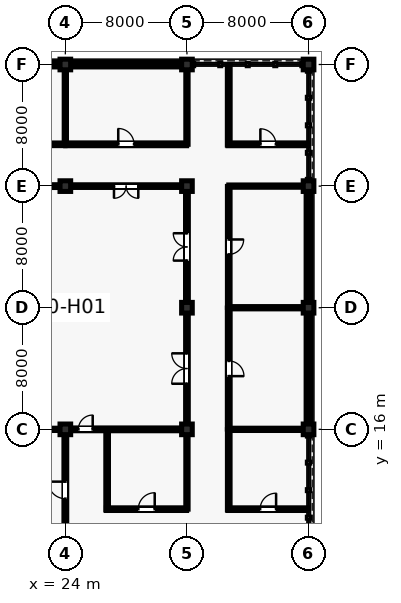
"""IFC4 building model, lengths in metres.
Left out: names, types, materials, properties, quantities, classifications, styles, units other than length and angle.
Written with IfcOpenShell. Run it as: python <this file> out.ifc"""

import sys

from ifc_helpers import new_model, si_unit, direction, frame, frame_2d, origin, origin_2d, place, context, subcontext, project, spatial, rectangle, extrude, element, fill, save


model = new_model("IFC4")
c1 = context("Model", 3, precision=1e-05, world=origin(), true_north=direction((0.0, 1.0)))
c2 = subcontext(c1, "Body", "Model", "MODEL_VIEW")
j1 = project(units=[si_unit("LENGTHUNIT", "METRE"), si_unit("PLANEANGLEUNIT", "RADIAN")], contexts=[c1])
p1 = place(None, origin())
s1 = spatial("IfcSite", under=j1, at=p1, CompositionType="ELEMENT")
p2 = place(p1, origin())
s2 = spatial("IfcBuilding", under=s1, at=p2, CompositionType="ELEMENT")
p3 = place(p2, origin())
s3 = spatial("IfcBuildingStorey", under=s2, at=p3, CompositionType="ELEMENT", Elevation=0.0)
for number, where, z_axis, x_axis in (
    (1, (24.0, 16.0, 0.0), (0.0, 0.0, 1.0), (1.0, 0.0, 0.0)),
    (2, (24.0, 32.0, 0.0), (0.0, 0.0, 1.0), (1.0, 0.0, 0.0)),
    (3, (24.0, 40.0, 0.0), (0.0, 0.0, 1.0), (1.0, 0.0, 0.0)),
    (4, (32.0, 16.0, 0.0), (0.0, 0.0, 1.0), (1.0, 0.0, 0.0)),
    (5, (32.0, 24.0, 0.0), (0.0, 0.0, 1.0), (1.0, 0.0, 0.0)),
    (6, (32.0, 32.0, 0.0), (0.0, 0.0, 1.0), (1.0, 0.0, 0.0)),
    (7, (32.0, 40.0, 0.0), (0.0, 0.0, 1.0), (1.0, 0.0, 0.0)),
    (8, (40.0, 16.0, 0.0), (0.0, 0.0, 1.0), (1.0, 0.0, 0.0)),
    (9, (40.0, 24.0, 0.0), (0.0, 0.0, 1.0), (1.0, 0.0, 0.0)),
    (10, (40.0, 32.0, 0.0), (0.0, 0.0, 1.0), (1.0, 0.0, 0.0)),
    (11, (40.0, 40.0, 0.0), (0.0, 0.0, 1.0), (1.0, 0.0, 0.0)),
):
    element("IfcColumn", number, at=place(p3, frame(where, z_axis=z_axis, x_axis=x_axis)), inside=s3, PredefinedType="COLUMN", context=c2, shape_type="SweptSolid", body=[
        extrude(rectangle(XDim=0.7, YDim=0.7, at=origin_2d()), origin(), (0.0, 0.0, 1.0), 5.28),
    ])
p4 = place(p3, frame((16.335, 40.0, 0.0), z_axis=(0.0, 0.0, 1.0), x_axis=(1.0, 0.0, 0.0)))
e12 = element("IfcWall", 12, at=p4, inside=s3, PredefinedType="SOLIDWALL", context=c2, shape_type="SweptSolid", body=[
    extrude(rectangle(XDim=7.33, YDim=0.32, at=frame_2d((3.665, 0.0))), origin(), (0.0, 0.0, 1.0), 4.677),
])
p5 = place(p4, frame((2.74, 0.0, 0.9)))
e13 = element("IfcOpeningElement", 13, at=p5, cuts=e12, PredefinedType="OPENING", context=c2, shape_type="SweptSolid", body=[
    extrude(rectangle(XDim=1.85, YDim=2.65, at=frame_2d((0.925, 1.325))), frame((0.0, 0.17, 0.0), z_axis=(0.0, -1.0, 0.0), x_axis=(1.0, 0.0, 0.0)), (0.0, 0.0, 1.0), 0.34),
])
p6 = place(p3, frame((24.335, 40.0, 0.0), z_axis=(0.0, 0.0, 1.0), x_axis=(1.0, 0.0, 0.0)))
e14 = element("IfcWall", 14, at=p6, inside=s3, PredefinedType="SOLIDWALL", context=c2, shape_type="SweptSolid", body=[
    extrude(rectangle(XDim=7.33, YDim=0.32, at=frame_2d((3.665, 0.0))), origin(), (0.0, 0.0, 1.0), 4.61),
])
p7 = place(p6, frame((2.515, 0.0, 0.9)))
e15 = element("IfcOpeningElement", 15, at=p7, cuts=e14, PredefinedType="OPENING", context=c2, shape_type="SweptSolid", body=[
    extrude(rectangle(XDim=2.3, YDim=2.55, at=frame_2d((1.15, 1.275))), frame((0.0, 0.17, 0.0), z_axis=(0.0, -1.0, 0.0), x_axis=(1.0, 0.0, 0.0)), (0.0, 0.0, 1.0), 0.34),
])
p8 = place(p3, frame((40.0, 16.335, 0.0), z_axis=(0.0, 0.0, 1.0), x_axis=(0.0, 1.0, 0.0)))
e16 = element("IfcWall", 16, at=p8, inside=s3, PredefinedType="SOLIDWALL", context=c2, shape_type="SweptSolid", body=[
    extrude(rectangle(XDim=7.33, YDim=0.32, at=frame_2d((3.665, 0.0))), origin(), (0.0, 0.0, 1.0), 4.677),
])
p9 = place(p8, frame((2.74, 0.0, 0.9)))
e17 = element("IfcOpeningElement", 17, at=p9, cuts=e16, PredefinedType="OPENING", context=c2, shape_type="SweptSolid", body=[
    extrude(rectangle(XDim=1.85, YDim=2.65, at=frame_2d((0.925, 1.325))), frame((0.0, 0.17, 0.0), z_axis=(0.0, -1.0, 0.0), x_axis=(1.0, 0.0, 0.0)), (0.0, 0.0, 1.0), 0.34),
])
p10 = place(p3, frame((40.0, 24.335, 0.0), z_axis=(0.0, 0.0, 1.0), x_axis=(0.0, 1.0, 0.0)))
e18 = element("IfcWall", 18, at=p10, inside=s3, PredefinedType="SOLIDWALL", context=c2, shape_type="SweptSolid", body=[
    extrude(rectangle(XDim=7.33, YDim=0.32, at=frame_2d((3.665, 0.0))), origin(), (0.0, 0.0, 1.0), 4.61),
])
p11 = place(p10, frame((2.515, 0.0, 0.9)))
e19 = element("IfcOpeningElement", 19, at=p11, cuts=e18, PredefinedType="OPENING", context=c2, shape_type="SweptSolid", body=[
    extrude(rectangle(XDim=2.3, YDim=2.55, at=frame_2d((1.15, 1.275))), frame((0.0, 0.17, 0.0), z_axis=(0.0, -1.0, 0.0), x_axis=(1.0, 0.0, 0.0)), (0.0, 0.0, 1.0), 0.34),
])
p12 = place(p3, frame((16.02, 34.75, 0.0), z_axis=(0.0, 0.0, 1.0), x_axis=(1.0, 0.0, 0.0)))
e20 = element("IfcWall", 20, at=p12, inside=s3, PredefinedType="PARTITIONING", context=c2, shape_type="SweptSolid", body=[
    extrude(rectangle(XDim=7.96, YDim=0.175, at=frame_2d((3.98, 0.0))), origin(), (0.0, 0.0, 1.0), 4.404),
])
p13 = place(p12, frame((3.49, 0.0, 0.0)))
e21 = element("IfcOpeningElement", 21, at=p13, cuts=e20, PredefinedType="OPENING", context=c2, shape_type="SweptSolid", body=[
    extrude(rectangle(XDim=0.98, YDim=2.15, at=frame_2d((0.49, 1.075))), frame((0.0, 0.097, 0.0), z_axis=(0.0, -1.0, 0.0), x_axis=(1.0, 0.0, 0.0)), (0.0, 0.0, 1.0), 0.195),
])
p14 = place(p3, frame((24.0, 34.75, 0.0), z_axis=(0.0, 0.0, 1.0), x_axis=(0.0, 1.0, 0.0)))
e22 = element("IfcWall", 22, at=p14, inside=s3, PredefinedType="PARTITIONING", context=c2, shape_type="SweptSolid", body=[
    extrude(rectangle(XDim=4.89, YDim=0.15, at=frame_2d((2.445, 0.0))), origin(), (0.0, 0.0, 1.0), 4.471),
])
p15 = place(p3, frame((26.7, 10.75, 0.0), z_axis=(0.0, 0.0, 1.0), x_axis=(1.0, 0.0, 0.0)))
e23 = element("IfcWall", 23, at=p15, inside=s3, PredefinedType="PARTITIONING", context=c2, shape_type="SweptSolid", body=[
    extrude(rectangle(XDim=5.28, YDim=0.175, at=frame_2d((2.64, 0.0))), origin(), (0.0, 0.0, 1.0), 4.412),
])
p16 = place(p15, frame((2.1, 0.0, 0.0)))
e24 = element("IfcOpeningElement", 24, at=p16, cuts=e23, PredefinedType="OPENING", context=c2, shape_type="SweptSolid", body=[
    extrude(rectangle(XDim=1.08, YDim=2.2, at=frame_2d((0.54, 1.1))), frame((0.0, 0.097, 0.0), z_axis=(0.0, -1.0, 0.0), x_axis=(1.0, 0.0, 0.0)), (0.0, 0.0, 1.0), 0.195),
])
p17 = place(p3, frame((26.75, 10.7, 0.0), z_axis=(0.0, 0.0, 1.0), x_axis=(0.0, 1.0, 0.0)))
e25 = element("IfcWall", 25, at=p17, inside=s3, PredefinedType="PARTITIONING", context=c2, shape_type="SweptSolid", body=[
    extrude(rectangle(XDim=5.28, YDim=0.175, at=frame_2d((2.64, 0.0))), origin(), (0.0, 0.0, 1.0), 4.667),
])
p18 = place(p3, frame((32.0, 10.75, 0.0), z_axis=(0.0, 0.0, 1.0), x_axis=(0.0, 1.0, 0.0)))
e26 = element("IfcWall", 26, at=p18, inside=s3, PredefinedType="PARTITIONING", context=c2, shape_type="SweptSolid", body=[
    extrude(rectangle(XDim=4.89, YDim=0.15, at=frame_2d((2.445, 0.0))), origin(), (0.0, 0.0, 1.0), 4.412),
])
p19 = place(p3, frame((24.02, 34.75, 0.0), z_axis=(0.0, 0.0, 1.0), x_axis=(1.0, 0.0, 0.0)))
e27 = element("IfcWall", 27, at=p19, inside=s3, PredefinedType="PARTITIONING", context=c2, shape_type="SweptSolid", body=[
    extrude(rectangle(XDim=7.96, YDim=0.185, at=frame_2d((3.98, 0.0))), origin(), (0.0, 0.0, 1.0), 4.403),
])
p20 = place(p19, frame((3.46, 0.0, 0.0)))
e28 = element("IfcOpeningElement", 28, at=p20, cuts=e27, PredefinedType="OPENING", context=c2, shape_type="SweptSolid", body=[
    extrude(rectangle(XDim=1.04, YDim=2.18, at=frame_2d((0.52, 1.09))), frame((0.0, 0.103, 0.0), z_axis=(0.0, -1.0, 0.0), x_axis=(1.0, 0.0, 0.0)), (0.0, 0.0, 1.0), 0.205),
])
p21 = place(p3, frame((32.0, 34.75, 0.0), z_axis=(0.0, 0.0, 1.0), x_axis=(0.0, 1.0, 0.0)))
e29 = element("IfcWall", 29, at=p21, inside=s3, PredefinedType="PARTITIONING", context=c2, shape_type="SweptSolid", body=[
    extrude(rectangle(XDim=4.89, YDim=0.15, at=frame_2d((2.445, 0.0))), origin(), (0.0, 0.0, 1.0), 4.403),
])
p22 = place(p3, frame((34.7, 10.75, 0.0), z_axis=(0.0, 0.0, 1.0), x_axis=(1.0, 0.0, 0.0)))
e30 = element("IfcWall", 30, at=p22, inside=s3, PredefinedType="PARTITIONING", context=c2, shape_type="SweptSolid", body=[
    extrude(rectangle(XDim=5.28, YDim=0.175, at=frame_2d((2.64, 0.0))), origin(), (0.0, 0.0, 1.0), 4.607),
])
p23 = place(p22, frame((2.115, 0.0, 0.0)))
e31 = element("IfcOpeningElement", 31, at=p23, cuts=e30, PredefinedType="OPENING", context=c2, shape_type="SweptSolid", body=[
    extrude(rectangle(XDim=1.05, YDim=2.15, at=frame_2d((0.525, 1.075))), frame((0.0, 0.097, 0.0), z_axis=(0.0, -1.0, 0.0), x_axis=(1.0, 0.0, 0.0)), (0.0, 0.0, 1.0), 0.195),
])
p24 = place(p3, frame((34.75, 10.7, 0.0), z_axis=(0.0, 0.0, 1.0), x_axis=(0.0, 1.0, 0.0)))
e32 = element("IfcWall", 32, at=p24, inside=s3, PredefinedType="PARTITIONING", context=c2, shape_type="SweptSolid", body=[
    extrude(rectangle(XDim=5.28, YDim=0.175, at=frame_2d((2.64, 0.0))), origin(), (0.0, 0.0, 1.0), 4.336),
])
p25 = place(p3, frame((34.75, 16.0, 0.0), z_axis=(0.0, 0.0, 1.0), x_axis=(1.0, 0.0, 0.0)))
e33 = element("IfcWall", 33, at=p25, inside=s3, PredefinedType="PARTITIONING", context=c2, shape_type="SweptSolid", body=[
    extrude(rectangle(XDim=4.89, YDim=0.15, at=frame_2d((2.445, 0.0))), origin(), (0.0, 0.0, 1.0), 4.336),
])
p26 = place(p3, frame((34.75, 16.02, 0.0), z_axis=(0.0, 0.0, 1.0), x_axis=(0.0, 1.0, 0.0)))
e34 = element("IfcWall", 34, at=p26, inside=s3, PredefinedType="PARTITIONING", context=c2, shape_type="SweptSolid", body=[
    extrude(rectangle(XDim=7.96, YDim=0.185, at=frame_2d((3.98, 0.0))), origin(), (0.0, 0.0, 1.0), 4.336),
])
p27 = place(p26, frame((3.48, 0.0, 0.0)))
e35 = element("IfcOpeningElement", 35, at=p27, cuts=e34, PredefinedType="OPENING", context=c2, shape_type="SweptSolid", body=[
    extrude(rectangle(XDim=1.0, YDim=2.15, at=frame_2d((0.5, 1.075))), frame((0.0, 0.103, 0.0), z_axis=(0.0, -1.0, 0.0), x_axis=(1.0, 0.0, 0.0)), (0.0, 0.0, 1.0), 0.205),
])
p28 = place(p3, frame((34.75, 24.0, 0.0), z_axis=(0.0, 0.0, 1.0), x_axis=(1.0, 0.0, 0.0)))
e36 = element("IfcWall", 36, at=p28, inside=s3, PredefinedType="PARTITIONING", context=c2, shape_type="SweptSolid", body=[
    extrude(rectangle(XDim=4.89, YDim=0.15, at=frame_2d((2.445, 0.0))), origin(), (0.0, 0.0, 1.0), 4.404),
])
p29 = place(p3, frame((34.75, 24.02, 0.0), z_axis=(0.0, 0.0, 1.0), x_axis=(0.0, 1.0, 0.0)))
e37 = element("IfcWall", 37, at=p29, inside=s3, PredefinedType="PARTITIONING", context=c2, shape_type="SweptSolid", body=[
    extrude(rectangle(XDim=7.96, YDim=0.175, at=frame_2d((3.98, 0.0))), origin(), (0.0, 0.0, 1.0), 4.327),
])
p30 = place(p29, frame((3.49, 0.0, 0.0)))
e38 = element("IfcOpeningElement", 38, at=p30, cuts=e37, PredefinedType="OPENING", context=c2, shape_type="SweptSolid", body=[
    extrude(rectangle(XDim=0.98, YDim=2.15, at=frame_2d((0.49, 1.075))), frame((0.0, 0.097, 0.0), z_axis=(0.0, -1.0, 0.0), x_axis=(1.0, 0.0, 0.0)), (0.0, 0.0, 1.0), 0.195),
])
p31 = place(p3, frame((34.75, 32.0, 0.0), z_axis=(0.0, 0.0, 1.0), x_axis=(1.0, 0.0, 0.0)))
e39 = element("IfcWall", 39, at=p31, inside=s3, PredefinedType="PARTITIONING", context=c2, shape_type="SweptSolid", body=[
    extrude(rectangle(XDim=4.89, YDim=0.15, at=frame_2d((2.445, 0.0))), origin(), (0.0, 0.0, 1.0), 4.327),
])
p32 = place(p3, frame((34.7, 34.75, 0.0), z_axis=(0.0, 0.0, 1.0), x_axis=(1.0, 0.0, 0.0)))
e40 = element("IfcWall", 40, at=p32, inside=s3, PredefinedType="PARTITIONING", context=c2, shape_type="SweptSolid", body=[
    extrude(rectangle(XDim=5.28, YDim=0.185, at=frame_2d((2.64, 0.0))), origin(), (0.0, 0.0, 1.0), 4.667),
])
p33 = place(p32, frame((2.13, 0.0, 0.0)))
e41 = element("IfcOpeningElement", 41, at=p33, cuts=e40, PredefinedType="OPENING", context=c2, shape_type="SweptSolid", body=[
    extrude(rectangle(XDim=1.02, YDim=2.2, at=frame_2d((0.51, 1.1))), frame((0.0, 0.103, 0.0), z_axis=(0.0, -1.0, 0.0), x_axis=(1.0, 0.0, 0.0)), (0.0, 0.0, 1.0), 0.205),
])
p34 = place(p3, frame((34.75, 34.7, 0.0), z_axis=(0.0, 0.0, 1.0), x_axis=(0.0, 1.0, 0.0)))
e42 = element("IfcWall", 42, at=p34, inside=s3, PredefinedType="PARTITIONING", context=c2, shape_type="SweptSolid", body=[
    extrude(rectangle(XDim=5.28, YDim=0.185, at=frame_2d((2.64, 0.0))), origin(), (0.0, 0.0, 1.0), 4.667),
])
p35 = place(p3, frame((24.0, 8.34, 0.0), z_axis=(0.0, 0.0, 1.0), x_axis=(0.0, 1.0, 0.0)))
e43 = element("IfcWall", 43, at=p35, inside=s3, PredefinedType="PARTITIONING", context=c2, shape_type="SweptSolid", body=[
    extrude(rectangle(XDim=7.32, YDim=0.185, at=frame_2d((3.66, 0.0))), origin(), (0.0, 0.0, 1.0), 4.403),
])
p36 = place(p35, frame((3.1, 0.0, 0.0)))
e44 = element("IfcOpeningElement", 44, at=p36, cuts=e43, PredefinedType="OPENING", context=c2, shape_type="SweptSolid", body=[
    extrude(rectangle(XDim=1.12, YDim=2.22, at=frame_2d((0.56, 1.11))), frame((0.0, 0.103, 0.0), z_axis=(0.0, -1.0, 0.0), x_axis=(1.0, 0.0, 0.0)), (0.0, 0.0, 1.0), 0.205),
])
p37 = place(p3, frame((16.34, 16.0, 0.0), z_axis=(0.0, 0.0, 1.0), x_axis=(1.0, 0.0, 0.0)))
e45 = element("IfcWall", 45, at=p37, inside=s3, PredefinedType="PARTITIONING", context=c2, shape_type="SweptSolid", body=[
    extrude(rectangle(XDim=7.32, YDim=0.15, at=frame_2d((3.66, 0.0))), origin(), (0.0, 0.0, 1.0), 4.603),
])
p38 = place(p3, frame((16.34, 32.0, 0.0), z_axis=(0.0, 0.0, 1.0), x_axis=(1.0, 0.0, 0.0)))
e46 = element("IfcWall", 46, at=p38, inside=s3, PredefinedType="PARTITIONING", context=c2, shape_type="SweptSolid", body=[
    extrude(rectangle(XDim=7.32, YDim=0.185, at=frame_2d((3.66, 0.0))), origin(), (0.0, 0.0, 1.0), 4.607),
])
p39 = place(p38, frame((2.76, 0.0, 0.0)))
e47 = element("IfcOpeningElement", 47, at=p39, cuts=e46, PredefinedType="OPENING", context=c2, shape_type="SweptSolid", body=[
    extrude(rectangle(XDim=1.8, YDim=2.35, at=frame_2d((0.9, 1.175))), frame((0.0, 0.103, 0.0), z_axis=(0.0, -1.0, 0.0), x_axis=(1.0, 0.0, 0.0)), (0.0, 0.0, 1.0), 0.205),
])
p40 = place(p3, frame((24.34, 16.0, 0.0), z_axis=(0.0, 0.0, 1.0), x_axis=(1.0, 0.0, 0.0)))
e48 = element("IfcWall", 48, at=p40, inside=s3, PredefinedType="PARTITIONING", context=c2, shape_type="SweptSolid", body=[
    extrude(rectangle(XDim=7.32, YDim=0.185, at=frame_2d((3.66, 0.0))), origin(), (0.0, 0.0, 1.0), 4.667),
])
p41 = place(p40, frame((0.52, 0.0, 0.0)))
e49 = element("IfcOpeningElement", 49, at=p41, cuts=e48, PredefinedType="OPENING", context=c2, shape_type="SweptSolid", body=[
    extrude(rectangle(XDim=0.94, YDim=2.12, at=frame_2d((0.47, 1.06))), frame((0.0, 0.103, 0.0), z_axis=(0.0, -1.0, 0.0), x_axis=(1.0, 0.0, 0.0)), (0.0, 0.0, 1.0), 0.205),
])
p42 = place(p3, frame((32.0, 16.34, 0.0), z_axis=(0.0, 0.0, 1.0), x_axis=(0.0, 1.0, 0.0)))
e50 = element("IfcWall", 50, at=p42, inside=s3, PredefinedType="PARTITIONING", context=c2, shape_type="SweptSolid", body=[
    extrude(rectangle(XDim=7.32, YDim=0.175, at=frame_2d((3.66, 0.0))), origin(), (0.0, 0.0, 1.0), 4.607),
])
p43 = place(p42, frame((2.66, 0.0, 0.0)))
e51 = element("IfcOpeningElement", 51, at=p43, cuts=e50, PredefinedType="OPENING", context=c2, shape_type="SweptSolid", body=[
    extrude(rectangle(XDim=2.0, YDim=2.4, at=frame_2d((1.0, 1.2))), frame((0.0, 0.097, 0.0), z_axis=(0.0, -1.0, 0.0), x_axis=(1.0, 0.0, 0.0)), (0.0, 0.0, 1.0), 0.195),
])
p44 = place(p3, frame((32.0, 24.34, 0.0), z_axis=(0.0, 0.0, 1.0), x_axis=(0.0, 1.0, 0.0)))
e52 = element("IfcWall", 52, at=p44, inside=s3, PredefinedType="PARTITIONING", context=c2, shape_type="SweptSolid", body=[
    extrude(rectangle(XDim=7.32, YDim=0.185, at=frame_2d((3.66, 0.0))), origin(), (0.0, 0.0, 1.0), 4.67),
])
p45 = place(p44, frame((2.76, 0.0, 0.0)))
e53 = element("IfcOpeningElement", 53, at=p45, cuts=e52, PredefinedType="OPENING", context=c2, shape_type="SweptSolid", body=[
    extrude(rectangle(XDim=1.8, YDim=2.35, at=frame_2d((0.9, 1.175))), frame((0.0, 0.103, 0.0), z_axis=(0.0, -1.0, 0.0), x_axis=(1.0, 0.0, 0.0)), (0.0, 0.0, 1.0), 0.205),
])
p46 = place(p3, frame((24.34, 32.0, 0.0), z_axis=(0.0, 0.0, 1.0), x_axis=(1.0, 0.0, 0.0)))
e54 = element("IfcWall", 54, at=p46, inside=s3, PredefinedType="PARTITIONING", context=c2, shape_type="SweptSolid", body=[
    extrude(rectangle(XDim=7.32, YDim=0.175, at=frame_2d((3.66, 0.0))), origin(), (0.0, 0.0, 1.0), 4.67),
])
p47 = place(p46, frame((2.86, 0.0, 0.0)))
e55 = element("IfcOpeningElement", 55, at=p47, cuts=e54, PredefinedType="OPENING", context=c2, shape_type="SweptSolid", body=[
    extrude(rectangle(XDim=1.6, YDim=2.25, at=frame_2d((0.8, 1.125))), frame((0.0, 0.097, 0.0), z_axis=(0.0, -1.0, 0.0), x_axis=(1.0, 0.0, 0.0)), (0.0, 0.0, 1.0), 0.195),
])
p48 = place(p7, origin())
e56 = element("IfcWindow", 56, at=p48, inside=s3, PartitioningType="SINGLE_PANEL", PredefinedType="WINDOW", context=c2, shape_type="SweptSolid", body=[
    extrude(rectangle(XDim=2.3, YDim=2.55, at=frame_2d((1.15, 1.275))), frame((0.0, 0.03, 0.0), z_axis=(0.0, -1.0, 0.0), x_axis=(1.0, 0.0, 0.0)), (0.0, 0.0, 1.0), 0.06),
])
fill(e15, e56)
p49 = place(p9, origin())
e57 = element("IfcWindow", 57, at=p49, inside=s3, PartitioningType="SINGLE_PANEL", PredefinedType="WINDOW", context=c2, shape_type="SweptSolid", body=[
    extrude(rectangle(XDim=1.85, YDim=2.65, at=frame_2d((0.925, 1.325))), frame((0.0, 0.03, 0.0), z_axis=(0.0, -1.0, 0.0), x_axis=(1.0, 0.0, 0.0)), (0.0, 0.0, 1.0), 0.06),
])
fill(e17, e57)
p50 = place(p11, origin())
e58 = element("IfcWindow", 58, at=p50, inside=s3, PartitioningType="SINGLE_PANEL", PredefinedType="WINDOW", context=c2, shape_type="SweptSolid", body=[
    extrude(rectangle(XDim=2.3, YDim=2.55, at=frame_2d((1.15, 1.275))), frame((0.0, 0.03, 0.0), z_axis=(0.0, -1.0, 0.0), x_axis=(1.0, 0.0, 0.0)), (0.0, 0.0, 1.0), 0.06),
])
fill(e19, e58)
p51 = place(p16, origin())
e59 = element("IfcDoor", 59, at=p51, inside=s3, OperationType="SINGLE_SWING_RIGHT", PredefinedType="DOOR", context=c2, shape_type="SweptSolid", body=[
    extrude(rectangle(XDim=1.08, YDim=2.2, at=frame_2d((0.54, 1.1))), frame((0.0, 0.025, 0.0), z_axis=(0.0, -1.0, 0.0), x_axis=(1.0, 0.0, 0.0)), (0.0, 0.0, 1.0), 0.05),
])
fill(e24, e59)
p52 = place(p20, origin())
e60 = element("IfcDoor", 60, at=p52, inside=s3, OperationType="SINGLE_SWING_LEFT", PredefinedType="DOOR", context=c2, shape_type="SweptSolid", body=[
    extrude(rectangle(XDim=1.04, YDim=2.18, at=frame_2d((0.52, 1.09))), frame((0.0, 0.025, 0.0), z_axis=(0.0, -1.0, 0.0), x_axis=(1.0, 0.0, 0.0)), (0.0, 0.0, 1.0), 0.05),
])
fill(e28, e60)
p53 = place(p23, origin())
e61 = element("IfcDoor", 61, at=p53, inside=s3, OperationType="SINGLE_SWING_RIGHT", PredefinedType="DOOR", context=c2, shape_type="SweptSolid", body=[
    extrude(rectangle(XDim=1.05, YDim=2.15, at=frame_2d((0.525, 1.075))), frame((0.0, 0.025, 0.0), z_axis=(0.0, -1.0, 0.0), x_axis=(1.0, 0.0, 0.0)), (0.0, 0.0, 1.0), 0.05),
])
fill(e31, e61)
p54 = place(p27, frame((1.0, 0.0, 0.0), z_axis=(0.0, 0.0, 1.0), x_axis=(-1.0, 0.0, 0.0)))
e62 = element("IfcDoor", 62, at=p54, inside=s3, OperationType="SINGLE_SWING_LEFT", PredefinedType="DOOR", context=c2, shape_type="SweptSolid", body=[
    extrude(rectangle(XDim=1.0, YDim=2.15, at=frame_2d((0.5, 1.075))), frame((0.0, 0.025, 0.0), z_axis=(0.0, -1.0, 0.0), x_axis=(1.0, 0.0, 0.0)), (0.0, 0.0, 1.0), 0.05),
])
fill(e35, e62)
p55 = place(p30, frame((0.98, 0.0, 0.0), z_axis=(0.0, 0.0, 1.0), x_axis=(-1.0, 0.0, 0.0)))
e63 = element("IfcDoor", 63, at=p55, inside=s3, OperationType="SINGLE_SWING_RIGHT", PredefinedType="DOOR", context=c2, shape_type="SweptSolid", body=[
    extrude(rectangle(XDim=0.98, YDim=2.15, at=frame_2d((0.49, 1.075))), frame((0.0, 0.025, 0.0), z_axis=(0.0, -1.0, 0.0), x_axis=(1.0, 0.0, 0.0)), (0.0, 0.0, 1.0), 0.05),
])
fill(e38, e63)
p56 = place(p33, origin())
e64 = element("IfcDoor", 64, at=p56, inside=s3, OperationType="SINGLE_SWING_LEFT", PredefinedType="DOOR", context=c2, shape_type="SweptSolid", body=[
    extrude(rectangle(XDim=1.02, YDim=2.2, at=frame_2d((0.51, 1.1))), frame((0.0, 0.025, 0.0), z_axis=(0.0, -1.0, 0.0), x_axis=(1.0, 0.0, 0.0)), (0.0, 0.0, 1.0), 0.05),
])
fill(e41, e64)
p57 = place(p36, origin())
e65 = element("IfcDoor", 65, at=p57, inside=s3, OperationType="SINGLE_SWING_RIGHT", PredefinedType="DOOR", context=c2, shape_type="SweptSolid", body=[
    extrude(rectangle(XDim=1.12, YDim=2.22, at=frame_2d((0.56, 1.11))), frame((0.0, 0.025, 0.0), z_axis=(0.0, -1.0, 0.0), x_axis=(1.0, 0.0, 0.0)), (0.0, 0.0, 1.0), 0.05),
])
fill(e44, e65)
p58 = place(p41, origin())
e66 = element("IfcDoor", 66, at=p58, inside=s3, OperationType="SINGLE_SWING_RIGHT", PredefinedType="DOOR", context=c2, shape_type="SweptSolid", body=[
    extrude(rectangle(XDim=0.94, YDim=2.12, at=frame_2d((0.47, 1.06))), frame((0.0, 0.025, 0.0), z_axis=(0.0, -1.0, 0.0), x_axis=(1.0, 0.0, 0.0)), (0.0, 0.0, 1.0), 0.05),
])
fill(e49, e66)
p59 = place(p43, origin())
e67 = element("IfcDoor", 67, at=p59, inside=s3, OperationType="DOUBLE_DOOR_SINGLE_SWING", PredefinedType="DOOR", context=c2, shape_type="SweptSolid", body=[
    extrude(rectangle(XDim=2.0, YDim=2.4, at=frame_2d((1.0, 1.2))), frame((0.0, 0.025, 0.0), z_axis=(0.0, -1.0, 0.0), x_axis=(1.0, 0.0, 0.0)), (0.0, 0.0, 1.0), 0.05),
])
fill(e51, e67)
p60 = place(p45, origin())
e68 = element("IfcDoor", 68, at=p60, inside=s3, OperationType="DOUBLE_DOOR_SINGLE_SWING", PredefinedType="DOOR", context=c2, shape_type="SweptSolid", body=[
    extrude(rectangle(XDim=1.8, YDim=2.35, at=frame_2d((0.9, 1.175))), frame((0.0, 0.025, 0.0), z_axis=(0.0, -1.0, 0.0), x_axis=(1.0, 0.0, 0.0)), (0.0, 0.0, 1.0), 0.05),
])
fill(e53, e68)
p61 = place(p47, frame((1.6, 0.0, 0.0), z_axis=(0.0, 0.0, 1.0), x_axis=(-1.0, 0.0, 0.0)))
e69 = element("IfcDoor", 69, at=p61, inside=s3, OperationType="DOUBLE_DOOR_SINGLE_SWING", PredefinedType="DOOR", context=c2, shape_type="SweptSolid", body=[
    extrude(rectangle(XDim=1.6, YDim=2.25, at=frame_2d((0.8, 1.125))), frame((0.0, 0.025, 0.0), z_axis=(0.0, -1.0, 0.0), x_axis=(1.0, 0.0, 0.0)), (0.0, 0.0, 1.0), 0.05),
])
fill(e55, e69)
save(model, sys.argv[1])
